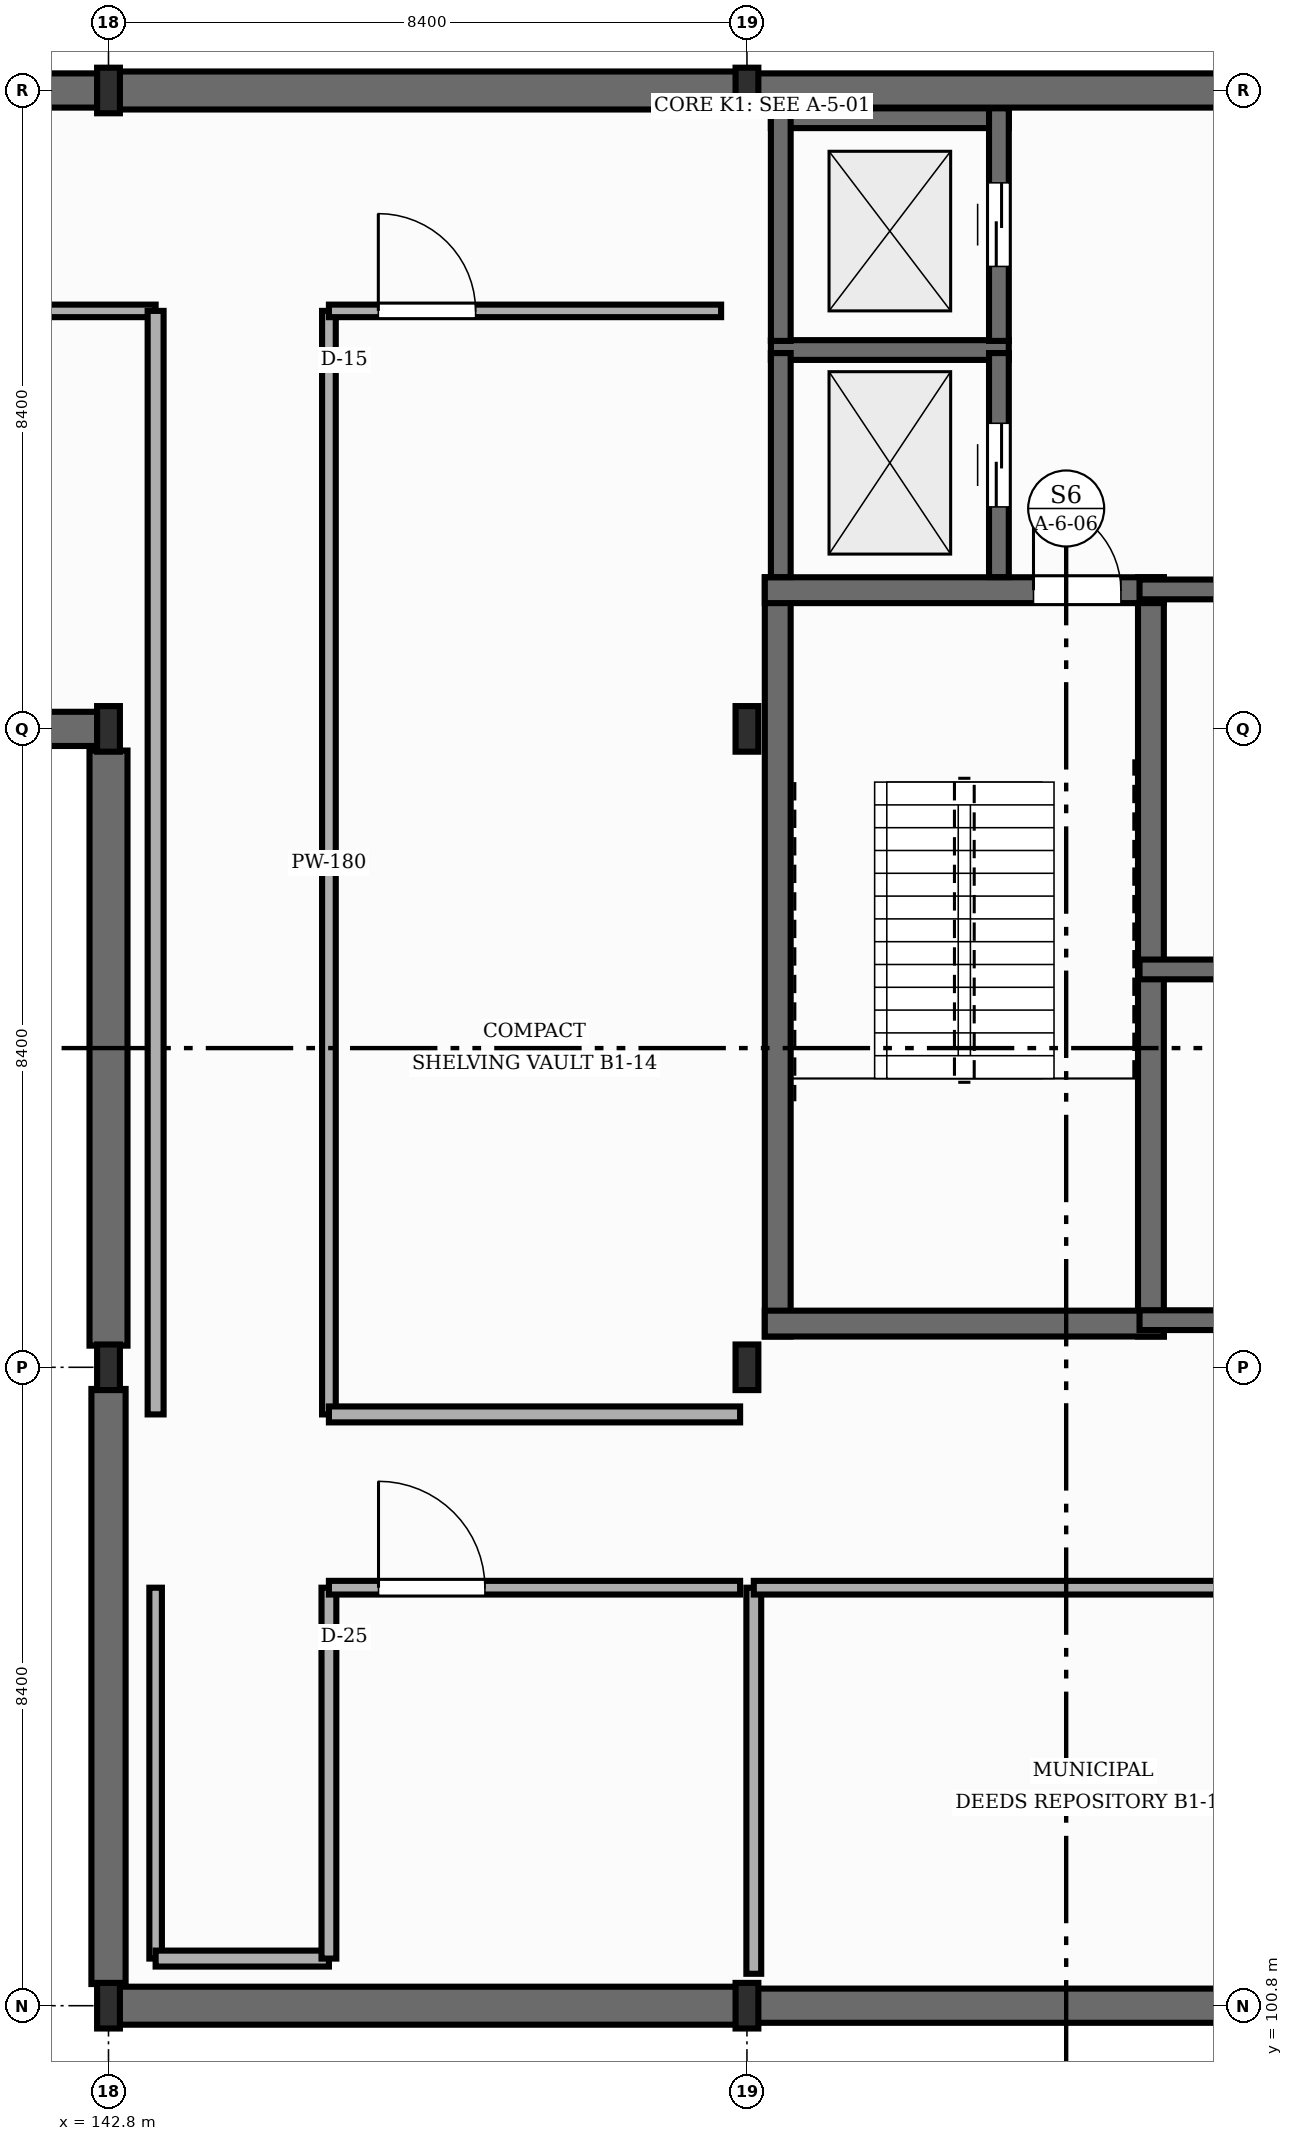
"""IFC4 building model, lengths in metres.
Left out: names, types, materials, properties, quantities, classifications, styles, units other than length and angle.
Written with IfcOpenShell. Run it as: python <this file> out.ifc"""

import sys

from ifc_helpers import new_model, si_unit, direction, frame, frame_2d, origin, origin_2d, place, context, subcontext, project, spatial, rectangle, i_section, extrude, element, fill, save


model = new_model("IFC4")
c1 = context("Model", 3, precision=1e-05, world=origin(), true_north=direction((0.0, 1.0)))
c2 = subcontext(c1, "Body", "Model", "MODEL_VIEW")
j1 = project(units=[si_unit("LENGTHUNIT", "METRE"), si_unit("PLANEANGLEUNIT", "RADIAN")], contexts=[c1])
p1 = place(None, origin())
s1 = spatial("IfcSite", under=j1, at=p1, CompositionType="ELEMENT")
p2 = place(p1, origin())
s2 = spatial("IfcBuilding", under=s1, at=p2, CompositionType="ELEMENT")
p3 = place(p2, frame((0.0, 0.0, -4.5)))
s3 = spatial("IfcBuildingStorey", under=s2, at=p3, CompositionType="ELEMENT", Elevation=-4.5)
for number, where, z_axis, x_axis in (
    (1, (142.8, 100.8, 0.0), (0.0, 0.0, 1.0), (1.0, 0.0, 0.0)),
    (2, (142.8, 109.2, 0.0), (0.0, 0.0, 1.0), (1.0, 0.0, 0.0)),
    (3, (142.8, 117.6, 0.0), (0.0, 0.0, 1.0), (1.0, 0.0, 0.0)),
    (4, (142.8, 126.0, 0.0), (0.0, 0.0, 1.0), (1.0, 0.0, 0.0)),
    (5, (151.2, 100.8, 0.0), (0.0, 0.0, 1.0), (1.0, 0.0, 0.0)),
    (6, (151.2, 109.2, 0.0), (0.0, 0.0, 1.0), (1.0, 0.0, 0.0)),
    (7, (151.2, 117.6, 0.0), (0.0, 0.0, 1.0), (1.0, 0.0, 0.0)),
    (8, (151.2, 126.0, 0.0), (0.0, 0.0, 1.0), (1.0, 0.0, 0.0)),
):
    element("IfcColumn", number, at=place(p3, frame(where, z_axis=z_axis, x_axis=x_axis)), inside=s3, PredefinedType="COLUMN", context=c2, shape_type="SweptSolid", body=[
        extrude(i_section(OverallWidth=0.3, OverallDepth=0.6, WebThickness=0.015, FlangeThickness=0.03, FilletRadius=0.027, at=origin_2d()), origin(), (0.0, 0.0, 1.0), 4.5),
    ])
p4 = place(p3, frame((134.408, 117.6, 0.0), z_axis=(0.0, 0.0, 1.0), x_axis=(1.0, 0.0, 0.0)))
e9 = element("IfcWall", 9, at=p4, inside=s3, PredefinedType="USERDEFINED", context=c2, shape_type="SweptSolid", body=[
    extrude(rectangle(XDim=8.384, YDim=0.45, at=frame_2d((4.192, 0.0))), origin(), (0.0, 0.0, 1.0), 4.25),
])
p5 = place(p3, frame((142.8, 117.315, 0.0), z_axis=(0.0, 0.0, 1.0), x_axis=(0.0, -1.0, 0.0)))
e10 = element("IfcWall", 10, at=p5, inside=s3, PredefinedType="USERDEFINED", context=c2, shape_type="SweptSolid", body=[
    extrude(rectangle(XDim=7.83, YDim=0.5, at=frame_2d((3.915, 0.0))), origin(), (0.0, 0.0, 1.0), 4.25),
])
p6 = place(p3, frame((142.8, 108.915, 0.0), z_axis=(0.0, 0.0, 1.0), x_axis=(0.0, -1.0, 0.0)))
e11 = element("IfcWall", 11, at=p6, inside=s3, PredefinedType="USERDEFINED", context=c2, shape_type="SweptSolid", body=[
    extrude(rectangle(XDim=7.83, YDim=0.45, at=frame_2d((3.915, 0.0))), origin(), (0.0, 0.0, 1.0), 4.25),
])
p7 = place(p3, frame((142.808, 100.8, 0.0), z_axis=(0.0, 0.0, 1.0), x_axis=(1.0, 0.0, 0.0)))
e12 = element("IfcWall", 12, at=p7, inside=s3, PredefinedType="USERDEFINED", context=c2, shape_type="SweptSolid", body=[
    extrude(rectangle(XDim=8.384, YDim=0.5, at=frame_2d((4.192, 0.0))), origin(), (0.0, 0.0, 1.0), 4.25),
])
for number, where, z_axis, x_axis in (
    (13, (151.208, 100.8, 0.0), (0.0, 0.0, 1.0), (1.0, 0.0, 0.0)),
    (14, (159.592, 126.0, 0.0), (0.0, 0.0, 1.0), (-1.0, 0.0, 0.0)),
):
    element("IfcWall", number, at=place(p3, frame(where, z_axis=z_axis, x_axis=x_axis)), inside=s3, PredefinedType="USERDEFINED", context=c2, shape_type="SweptSolid", body=[
        extrude(rectangle(XDim=8.384, YDim=0.45, at=frame_2d((4.192, 0.0))), origin(), (0.0, 0.0, 1.0), 4.25),
    ])
p8 = place(p3, frame((151.192, 126.0, 0.0), z_axis=(0.0, 0.0, 1.0), x_axis=(-1.0, 0.0, 0.0)))
e15 = element("IfcWall", 15, at=p8, inside=s3, PredefinedType="USERDEFINED", context=c2, shape_type="SweptSolid", body=[
    extrude(rectangle(XDim=8.384, YDim=0.5, at=frame_2d((4.192, 0.0))), origin(), (0.0, 0.0, 1.0), 4.25),
])
p9 = place(p3, frame((142.792, 126.0, 0.0), z_axis=(0.0, 0.0, 1.0), x_axis=(-1.0, 0.0, 0.0)))
e16 = element("IfcWall", 16, at=p9, inside=s3, PredefinedType="USERDEFINED", context=c2, shape_type="SweptSolid", body=[
    extrude(rectangle(XDim=8.384, YDim=0.45, at=frame_2d((4.192, 0.0))), origin(), (0.0, 0.0, 1.0), 4.25),
])
for number, where, z_axis, x_axis in (
    (17, (151.605, 109.605, 0.0), (0.0, 0.0, 1.0), (0.0, 1.0, 0.0)),
    (18, (156.515, 109.605, 0.0), (0.0, 0.0, 1.0), (0.0, 1.0, 0.0)),
):
    element("IfcWall", number, at=place(p3, frame(where, z_axis=z_axis, x_axis=x_axis)), inside=s3, PredefinedType="SHEAR", context=c2, shape_type="SweptSolid", body=[
        extrude(rectangle(XDim=9.99, YDim=0.34, at=frame_2d((4.995, 0.0))), origin(), (0.0, 0.0, 1.0), 4.25),
    ])
p10 = place(p3, frame((151.435, 109.775, 0.0), z_axis=(0.0, 0.0, 1.0), x_axis=(1.0, 0.0, 0.0)))
e19 = element("IfcWall", 19, at=p10, inside=s3, PredefinedType="SHEAR", context=c2, shape_type="SweptSolid", body=[
    extrude(rectangle(XDim=5.25, YDim=0.34, at=frame_2d((2.625, 0.0))), origin(), (0.0, 0.0, 1.0), 4.25),
])
p11 = place(p3, frame((151.435, 119.425, 0.0), z_axis=(0.0, 0.0, 1.0), x_axis=(1.0, 0.0, 0.0)))
e20 = element("IfcWall", 20, at=p11, inside=s3, PredefinedType="SHEAR", context=c2, shape_type="SweptSolid", body=[
    extrude(rectangle(XDim=5.25, YDim=0.34, at=frame_2d((2.625, 0.0))), origin(), (0.0, 0.0, 1.0), 4.25),
])
p12 = place(p11, frame((3.535, 0.0, 0.0)))
e21 = element("IfcOpeningElement", 21, at=p12, cuts=e20, PredefinedType="OPENING", context=c2, shape_type="SweptSolid", body=[
    extrude(rectangle(XDim=1.15, YDim=2.15, at=frame_2d((0.575, 1.075))), frame((0.0, 0.18, 0.0), z_axis=(0.0, -1.0, 0.0), x_axis=(1.0, 0.0, 0.0)), (0.0, 0.0, 1.0), 0.36),
])
p13 = place(p3, frame((151.515, 122.585, 0.0), z_axis=(0.0, 0.0, 1.0), x_axis=(1.0, 0.0, 0.0)))
e22 = element("IfcWall", 22, at=p13, inside=s3, PredefinedType="SHEAR", context=c2, shape_type="SweptSolid", body=[
    extrude(rectangle(XDim=3.13, YDim=0.26, at=frame_2d((1.565, 0.0))), origin(), (0.0, 0.0, 1.0), 4.25),
])
p14 = place(p3, frame((151.645, 119.597, 0.0), z_axis=(0.0, 0.0, 1.0), x_axis=(0.0, 1.0, 0.0)))
e23 = element("IfcWall", 23, at=p14, inside=s3, PredefinedType="SHEAR", context=c2, shape_type="SweptSolid", body=[
    extrude(rectangle(XDim=2.948, YDim=0.26, at=frame_2d((1.474, 0.0))), origin(), (0.0, 0.0, 1.0), 4.25),
])
p15 = place(p3, frame((154.515, 119.597, 0.0), z_axis=(0.0, 0.0, 1.0), x_axis=(0.0, 1.0, 0.0)))
e24 = element("IfcWall", 24, at=p15, inside=s3, PredefinedType="SHEAR", context=c2, shape_type="SweptSolid", body=[
    extrude(rectangle(XDim=2.948, YDim=0.26, at=frame_2d((1.474, 0.0))), origin(), (0.0, 0.0, 1.0), 4.25),
])
p16 = place(p15, frame((0.924, 0.0, 0.0)))
e25 = element("IfcOpeningElement", 25, at=p16, cuts=e24, PredefinedType="OPENING", context=c2, shape_type="SweptSolid", body=[
    extrude(rectangle(XDim=1.1, YDim=2.15, at=frame_2d((0.55, 1.075))), frame((0.0, 0.14, 0.0), z_axis=(0.0, -1.0, 0.0), x_axis=(1.0, 0.0, 0.0)), (0.0, 0.0, 1.0), 0.28),
])
p17 = place(p3, frame((151.515, 125.635, 0.0), z_axis=(0.0, 0.0, 1.0), x_axis=(1.0, 0.0, 0.0)))
e26 = element("IfcWall", 26, at=p17, inside=s3, PredefinedType="SHEAR", context=c2, shape_type="SweptSolid", body=[
    extrude(rectangle(XDim=3.13, YDim=0.26, at=frame_2d((1.565, 0.0))), origin(), (0.0, 0.0, 1.0), 4.25),
])
p18 = place(p3, frame((151.645, 122.705, 0.0), z_axis=(0.0, 0.0, 1.0), x_axis=(0.0, 1.0, 0.0)))
e27 = element("IfcWall", 27, at=p18, inside=s3, PredefinedType="SHEAR", context=c2, shape_type="SweptSolid", body=[
    extrude(rectangle(XDim=3.06, YDim=0.26, at=frame_2d((1.53, 0.0))), origin(), (0.0, 0.0, 1.0), 4.25),
])
p19 = place(p3, frame((154.515, 122.705, 0.0), z_axis=(0.0, 0.0, 1.0), x_axis=(0.0, 1.0, 0.0)))
e28 = element("IfcWall", 28, at=p19, inside=s3, PredefinedType="SHEAR", context=c2, shape_type="SweptSolid", body=[
    extrude(rectangle(XDim=3.06, YDim=0.26, at=frame_2d((1.53, 0.0))), origin(), (0.0, 0.0, 1.0), 4.25),
])
p20 = place(p19, frame((0.98, 0.0, 0.0)))
e29 = element("IfcOpeningElement", 29, at=p20, cuts=e28, PredefinedType="OPENING", context=c2, shape_type="SweptSolid", body=[
    extrude(rectangle(XDim=1.1, YDim=2.15, at=frame_2d((0.55, 1.075))), frame((0.0, 0.14, 0.0), z_axis=(0.0, -1.0, 0.0), x_axis=(1.0, 0.0, 0.0)), (0.0, 0.0, 1.0), 0.28),
])
for number, where, z_axis, x_axis in (
    (30, (156.365, 109.82, 0.0), (0.0, 0.0, 1.0), (1.0, 0.0, 0.0)),
    (31, (156.365, 114.435, 0.0), (0.0, 0.0, 1.0), (1.0, 0.0, 0.0)),
    (32, (156.365, 119.435, 0.0), (0.0, 0.0, 1.0), (1.0, 0.0, 0.0)),
):
    element("IfcWall", number, at=place(p3, frame(where, z_axis=z_axis, x_axis=x_axis)), inside=s3, PredefinedType="SHEAR", context=c2, shape_type="SweptSolid", body=[
        extrude(rectangle(XDim=3.035, YDim=0.26, at=frame_2d((1.518, 0.0))), origin(), (0.0, 0.0, 1.0), 4.25),
    ])
p21 = place(p3, frame((145.7, 108.58, -0.004), z_axis=(0.0, 0.0, 1.0), x_axis=(0.0, 1.0, 0.0)))
e33 = element("IfcWall", 33, at=p21, inside=s3, PredefinedType="STANDARD", context=c2, shape_type="SweptSolid", body=[
    extrude(rectangle(XDim=14.52, YDim=0.18, at=frame_2d((7.26, 0.0))), origin(), (0.0, 0.0, 1.0), 3.936),
])
p22 = place(p3, frame((145.7, 123.1, -0.004), z_axis=(0.0, 0.0, 1.0), x_axis=(1.0, 0.0, 0.0)))
e34 = element("IfcWall", 34, at=p22, inside=s3, PredefinedType="STANDARD", context=c2, shape_type="SweptSolid", body=[
    extrude(rectangle(XDim=5.16, YDim=0.165, at=frame_2d((2.58, 0.0))), origin(), (0.0, 0.0, 1.0), 4.254),
])
p23 = place(p22, frame((0.65, 0.0, 0.015)))
e35 = element("IfcOpeningElement", 35, at=p23, cuts=e34, PredefinedType="OPENING", context=c2, shape_type="SweptSolid", body=[
    extrude(rectangle(XDim=1.28, YDim=2.14, at=frame_2d((0.64, 1.07))), frame((0.0, 0.093, 0.0), z_axis=(0.0, -1.0, 0.0), x_axis=(1.0, 0.0, 0.0)), (0.0, 0.0, 1.0), 0.185),
])
p24 = place(p3, frame((151.11, 108.58, -0.004), z_axis=(0.0, 0.0, 1.0), x_axis=(-1.0, 0.0, 0.0)))
e36 = element("IfcWall", 36, at=p24, inside=s3, PredefinedType="STANDARD", context=c2, shape_type="SweptSolid", body=[
    extrude(rectangle(XDim=5.41, YDim=0.21, at=frame_2d((2.705, 0.0))), origin(), (0.0, 0.0, 1.0), 4.254),
])
p25 = place(p3, frame((151.29, 101.22, -0.004), z_axis=(0.0, 0.0, 1.0), x_axis=(0.0, 1.0, 0.0)))
e37 = element("IfcWall", 37, at=p25, inside=s3, PredefinedType="STANDARD", context=c2, shape_type="SweptSolid", body=[
    extrude(rectangle(XDim=5.08, YDim=0.195, at=frame_2d((2.54, 0.0))), origin(), (0.0, 0.0, 1.0), 3.746),
])
p26 = place(p3, frame((151.29, 106.3, -0.004), z_axis=(0.0, 0.0, 1.0), x_axis=(1.0, 0.0, 0.0)))
e38 = element("IfcWall", 38, at=p26, inside=s3, PredefinedType="STANDARD", context=c2, shape_type="SweptSolid", body=[
    extrude(rectangle(XDim=8.93, YDim=0.18, at=frame_2d((4.465, 0.0))), origin(), (0.0, 0.0, 1.0), 4.254),
])
p27 = place(p3, frame((134.49, 123.1, -0.004), z_axis=(0.0, 0.0, 1.0), x_axis=(1.0, 0.0, 0.0)))
e39 = element("IfcWall", 39, at=p27, inside=s3, PredefinedType="STANDARD", context=c2, shape_type="SweptSolid", body=[
    extrude(rectangle(XDim=8.93, YDim=0.165, at=frame_2d((4.465, 0.0))), origin(), (0.0, 0.0, 1.0), 4.254),
])
p28 = place(p27, frame((4.005, 0.0, 0.015)))
e40 = element("IfcOpeningElement", 40, at=p28, cuts=e39, PredefinedType="OPENING", context=c2, shape_type="SweptSolid", body=[
    extrude(rectangle(XDim=0.92, YDim=2.22, at=frame_2d((0.46, 1.11))), frame((0.0, 0.093, 0.0), z_axis=(0.0, -1.0, 0.0), x_axis=(1.0, 0.0, 0.0)), (0.0, 0.0, 1.0), 0.185),
])
p29 = place(p3, frame((143.42, 123.1, -0.004), z_axis=(0.0, 0.0, 1.0), x_axis=(0.0, -1.0, 0.0)))
e41 = element("IfcWall", 41, at=p29, inside=s3, PredefinedType="STANDARD", context=c2, shape_type="SweptSolid", body=[
    extrude(rectangle(XDim=14.52, YDim=0.21, at=frame_2d((7.26, 0.0))), origin(), (0.0, 0.0, 1.0), 4.254),
])
p30 = place(p3, frame((143.42, 106.3, -0.004), z_axis=(0.0, 0.0, 1.0), x_axis=(0.0, -1.0, 0.0)))
e42 = element("IfcWall", 42, at=p30, inside=s3, PredefinedType="STANDARD", context=c2, shape_type="SweptSolid", body=[
    extrude(rectangle(XDim=4.88, YDim=0.165, at=frame_2d((2.44, 0.0))), origin(), (0.0, 0.0, 1.0), 4.254),
])
p31 = place(p3, frame((143.42, 101.42, -0.004), z_axis=(0.0, 0.0, 1.0), x_axis=(1.0, 0.0, 0.0)))
e43 = element("IfcWall", 43, at=p31, inside=s3, PredefinedType="STANDARD", context=c2, shape_type="SweptSolid", body=[
    extrude(rectangle(XDim=2.28, YDim=0.21, at=frame_2d((1.14, 0.0))), origin(), (0.0, 0.0, 1.0), 4.254),
])
p32 = place(p3, frame((145.7, 101.42, -0.004), z_axis=(0.0, 0.0, 1.0), x_axis=(0.0, 1.0, 0.0)))
e44 = element("IfcWall", 44, at=p32, inside=s3, PredefinedType="STANDARD", context=c2, shape_type="SweptSolid", body=[
    extrude(rectangle(XDim=4.88, YDim=0.195, at=frame_2d((2.44, 0.0))), origin(), (0.0, 0.0, 1.0), 3.996),
])
p33 = place(p3, frame((145.7, 106.3, -0.004), z_axis=(0.0, 0.0, 1.0), x_axis=(1.0, 0.0, 0.0)))
e45 = element("IfcWall", 45, at=p33, inside=s3, PredefinedType="STANDARD", context=c2, shape_type="SweptSolid", body=[
    extrude(rectangle(XDim=5.41, YDim=0.18, at=frame_2d((2.705, 0.0))), origin(), (0.0, 0.0, 1.0), 4.254),
])
p34 = place(p33, frame((0.653, 0.0, 0.015)))
e46 = element("IfcOpeningElement", 46, at=p34, cuts=e45, PredefinedType="OPENING", context=c2, shape_type="SweptSolid", body=[
    extrude(rectangle(XDim=1.4, YDim=2.22, at=frame_2d((0.7, 1.11))), frame((0.0, 0.1, 0.0), z_axis=(0.0, -1.0, 0.0), x_axis=(1.0, 0.0, 0.0)), (0.0, 0.0, 1.0), 0.2),
])
p35 = place(p12, origin())
e47 = element("IfcDoor", 47, at=p35, inside=s3, OperationType="SINGLE_SWING_LEFT", PredefinedType="DOOR", context=c2, shape_type="SweptSolid", body=[
    extrude(rectangle(XDim=1.15, YDim=2.15, at=frame_2d((0.575, 1.075))), frame((0.0, 0.025, 0.0), z_axis=(0.0, -1.0, 0.0), x_axis=(1.0, 0.0, 0.0)), (0.0, 0.0, 1.0), 0.05),
])
fill(e21, e47)
p36 = place(p16, origin())
e48 = element("IfcDoor", 48, at=p36, inside=s3, OperationType="DOUBLE_DOOR_SLIDING", PredefinedType="DOOR", context=c2, shape_type="SweptSolid", body=[
    extrude(rectangle(XDim=1.1, YDim=2.15, at=frame_2d((0.55, 1.075))), frame((0.0, 0.025, 0.0), z_axis=(0.0, -1.0, 0.0), x_axis=(1.0, 0.0, 0.0)), (0.0, 0.0, 1.0), 0.05),
])
fill(e25, e48)
p37 = place(p20, origin())
e49 = element("IfcDoor", 49, at=p37, inside=s3, OperationType="DOUBLE_DOOR_SLIDING", PredefinedType="DOOR", context=c2, shape_type="SweptSolid", body=[
    extrude(rectangle(XDim=1.1, YDim=2.15, at=frame_2d((0.55, 1.075))), frame((0.0, 0.025, 0.0), z_axis=(0.0, -1.0, 0.0), x_axis=(1.0, 0.0, 0.0)), (0.0, 0.0, 1.0), 0.05),
])
fill(e29, e49)
p38 = place(p23, origin())
e50 = element("IfcDoor", 50, at=p38, inside=s3, OperationType="SINGLE_SWING_LEFT", PredefinedType="DOOR", context=c2, shape_type="SweptSolid", body=[
    extrude(rectangle(XDim=1.28, YDim=2.14, at=frame_2d((0.64, 1.07))), frame((0.0, 0.025, 0.0), z_axis=(0.0, -1.0, 0.0), x_axis=(1.0, 0.0, 0.0)), (0.0, 0.0, 1.0), 0.05),
])
fill(e35, e50)
p39 = place(p34, origin())
e51 = element("IfcDoor", 51, at=p39, inside=s3, OperationType="SINGLE_SWING_LEFT", PredefinedType="DOOR", context=c2, shape_type="SweptSolid", body=[
    extrude(rectangle(XDim=1.4, YDim=2.22, at=frame_2d((0.7, 1.11))), frame((0.0, 0.025, 0.0), z_axis=(0.0, -1.0, 0.0), x_axis=(1.0, 0.0, 0.0)), (0.0, 0.0, 1.0), 0.05),
])
fill(e46, e51)
save(model, sys.argv[1])
